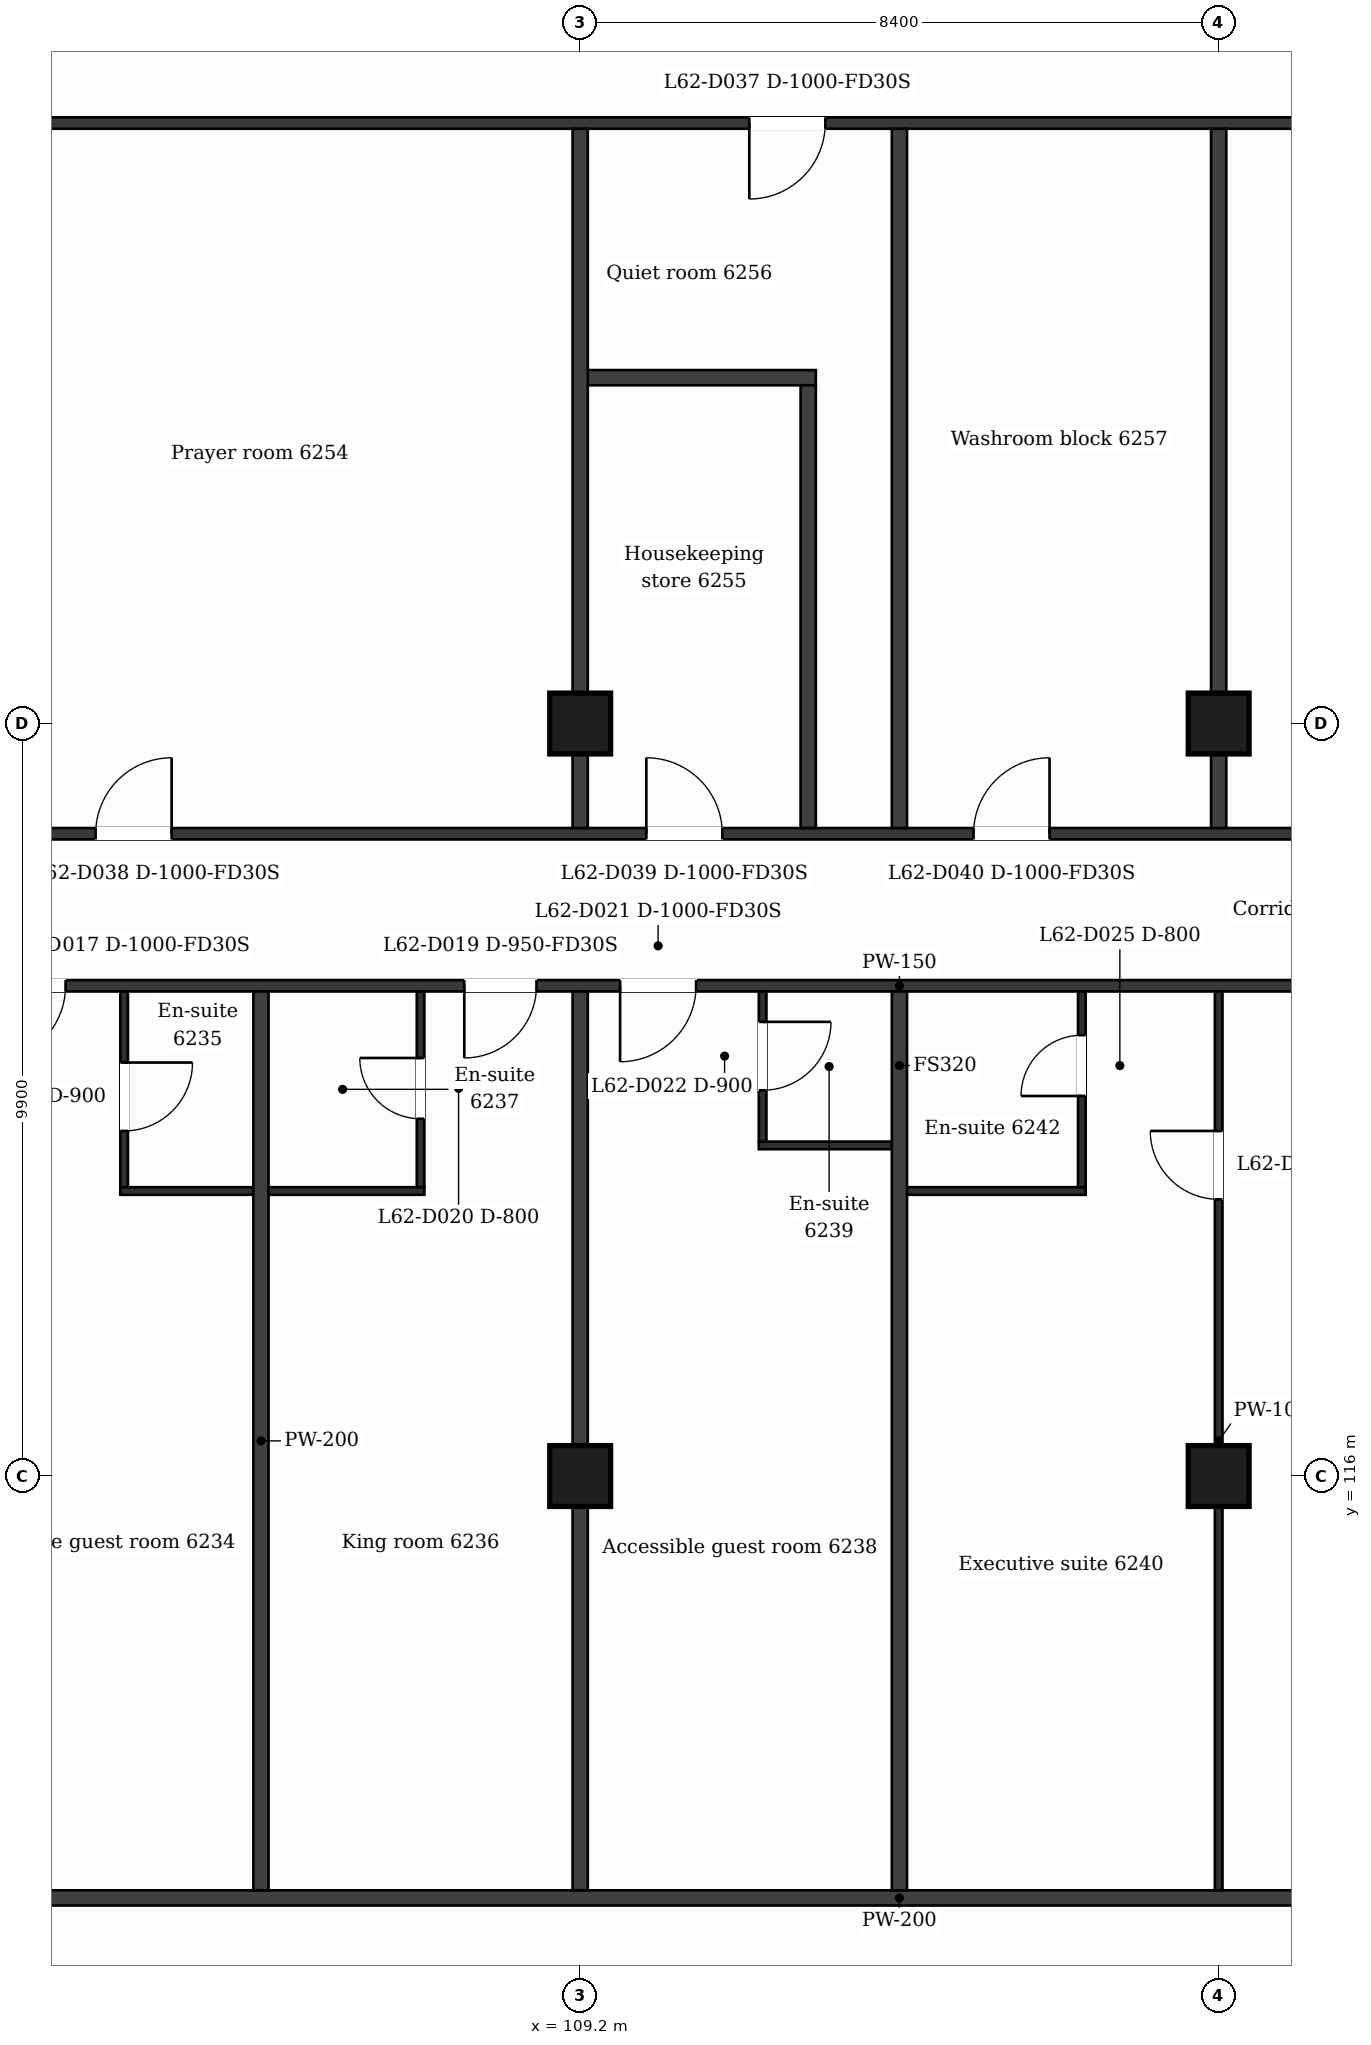
"""IFC4 building model, lengths in metres.
Left out: names, types, materials, properties, quantities, classifications, styles, units other than length and angle.
Written with IfcOpenShell. Run it as: python <this file> out.ifc"""

import sys

from ifc_helpers import new_model, si_unit, direction, frame, frame_2d, origin, origin_2d, place, context, subcontext, project, spatial, rectangle, extrude, element, fill, save


model = new_model("IFC4")
c1 = context("Model", 3, precision=1e-05, world=origin(), true_north=direction((0.0, 1.0)))
c2 = subcontext(c1, "Body", "Model", "MODEL_VIEW")
j1 = project(units=[si_unit("LENGTHUNIT", "METRE"), si_unit("PLANEANGLEUNIT", "RADIAN")], contexts=[c1])
p1 = place(None, origin())
s1 = spatial("IfcSite", under=j1, at=p1, CompositionType="ELEMENT")
p2 = place(p1, origin())
s2 = spatial("IfcBuilding", under=s1, at=p2, CompositionType="ELEMENT")
p3 = place(p2, frame((0.0, 0.0, 259.0)))
s3 = spatial("IfcBuildingStorey", under=s2, at=p3, CompositionType="ELEMENT", Elevation=259.0)
for number, where, z_axis, x_axis in (
    (1, (109.2, 116.0, 0.0), (0.0, 0.0, 1.0), (1.0, 0.0, 0.0)),
    (2, (117.6, 116.0, 0.0), (0.0, 0.0, 1.0), (1.0, 0.0, 0.0)),
    (3, (109.2, 125.9, 0.0), (0.0, 0.0, 1.0), (1.0, 0.0, 0.0)),
    (4, (117.6, 125.9, 0.0), (0.0, 0.0, 1.0), (1.0, 0.0, 0.0)),
):
    element("IfcColumn", number, at=place(p3, frame(where, z_axis=z_axis, x_axis=x_axis)), inside=s3, PredefinedType="COLUMN", context=c2, shape_type="SweptSolid", body=[
        extrude(rectangle(XDim=0.8, YDim=0.8, at=origin_2d()), origin(), (0.0, 0.0, 1.0), 3.7),
    ])
p4 = place(p3, frame((100.7, 110.45, 0.0), z_axis=(0.0, 0.0, 1.0), x_axis=(1.0, 0.0, 0.0)))
e5 = element("IfcWall", 5, at=p4, inside=s3, PredefinedType="PARTITIONING", context=c2, shape_type="SweptSolid", body=[
    extrude(rectangle(XDim=25.4, YDim=0.2, at=frame_2d((12.7, 0.0))), origin(), (0.0, 0.0, 1.0), 3.38),
])
p5 = place(p3, frame((103.15, 119.75, 0.0), z_axis=(0.0, 0.0, 1.0), x_axis=(1.0, 0.0, 0.0)))
e6 = element("IfcWall", 6, at=p5, inside=s3, PredefinedType="PARTITIONING", context=c2, shape_type="SweptSolid", body=[
    extrude(rectangle(XDim=4.0, YDim=0.1, at=frame_2d((2.0, 0.0))), origin(), (0.0, 0.0, 1.0), 3.38),
])
p6 = place(p3, frame((113.4, 119.75, 0.0), z_axis=(0.0, 0.0, 1.0), x_axis=(1.0, 0.0, 0.0)))
e7 = element("IfcWall", 7, at=p6, inside=s3, PredefinedType="PARTITIONING", context=c2, shape_type="SweptSolid", body=[
    extrude(rectangle(XDim=2.45, YDim=0.1, at=frame_2d((1.225, 0.0))), origin(), (0.0, 0.0, 1.0), 3.38),
])
p7 = place(p3, frame((111.55, 120.35, 0.0), z_axis=(0.0, 0.0, 1.0), x_axis=(1.0, 0.0, 0.0)))
e8 = element("IfcWall", 8, at=p7, inside=s3, PredefinedType="PARTITIONING", context=c2, shape_type="SweptSolid", body=[
    extrude(rectangle(XDim=1.85, YDim=0.1, at=frame_2d((0.925, 0.0))), origin(), (0.0, 0.0, 1.0), 3.38),
])
p8 = place(p3, frame((100.8, 122.45, 0.0), z_axis=(0.0, 0.0, 1.0), x_axis=(1.0, 0.0, 0.0)))
e9 = element("IfcWall", 9, at=p8, inside=s3, PredefinedType="PARTITIONING", context=c2, shape_type="SweptSolid", body=[
    extrude(rectangle(XDim=25.2, YDim=0.15, at=frame_2d((12.6, 0.0))), origin(), (0.0, 0.0, 1.0), 3.38),
])
p9 = place(p8, frame((0.63, 0.0, 0.0)))
e10 = element("IfcOpeningElement", 10, at=p9, cuts=e9, PredefinedType="OPENING", context=c2, shape_type="SweptSolid", body=[
    extrude(rectangle(XDim=1.0, YDim=2.1, at=frame_2d((0.5, 1.05))), frame((0.0, 0.085, 0.0), z_axis=(0.0, -1.0, 0.0), x_axis=(1.0, 0.0, 0.0)), (0.0, 0.0, 1.0), 0.17),
])
p10 = place(p8, frame((6.875, 0.0, 0.0)))
e11 = element("IfcOpeningElement", 11, at=p10, cuts=e9, PredefinedType="OPENING", context=c2, shape_type="SweptSolid", body=[
    extrude(rectangle(XDim=0.95, YDim=2.1, at=frame_2d((0.475, 1.05))), frame((0.0, 0.085, 0.0), z_axis=(0.0, -1.0, 0.0), x_axis=(1.0, 0.0, 0.0)), (0.0, 0.0, 1.0), 0.17),
])
p11 = place(p8, frame((8.925, 0.0, 0.0)))
e12 = element("IfcOpeningElement", 12, at=p11, cuts=e9, PredefinedType="OPENING", context=c2, shape_type="SweptSolid", body=[
    extrude(rectangle(XDim=1.0, YDim=2.1, at=frame_2d((0.5, 1.05))), frame((0.0, 0.085, 0.0), z_axis=(0.0, -1.0, 0.0), x_axis=(1.0, 0.0, 0.0)), (0.0, 0.0, 1.0), 0.17),
])
p12 = place(p8, frame((20.5, 0.0, 0.0)))
e13 = element("IfcOpeningElement", 13, at=p12, cuts=e9, PredefinedType="OPENING", context=c2, shape_type="SweptSolid", body=[
    extrude(rectangle(XDim=1.0, YDim=2.1, at=frame_2d((0.5, 1.05))), frame((0.0, 0.085, 0.0), z_axis=(0.0, -1.0, 0.0), x_axis=(1.0, 0.0, 0.0)), (0.0, 0.0, 1.0), 0.17),
])
p13 = place(p3, frame((100.8, 124.45, 0.0), z_axis=(0.0, 0.0, 1.0), x_axis=(1.0, 0.0, 0.0)))
e14 = element("IfcWall", 14, at=p13, inside=s3, PredefinedType="PARTITIONING", context=c2, shape_type="SweptSolid", body=[
    extrude(rectangle(XDim=25.2, YDim=0.15, at=frame_2d((12.6, 0.0))), origin(), (0.0, 0.0, 1.0), 3.38),
])
p14 = place(p13, frame((2.025, 0.0, 0.0)))
e15 = element("IfcOpeningElement", 15, at=p14, cuts=e14, PredefinedType="OPENING", context=c2, shape_type="SweptSolid", body=[
    extrude(rectangle(XDim=1.0, YDim=2.1, at=frame_2d((0.5, 1.05))), frame((0.0, 0.085, 0.0), z_axis=(0.0, -1.0, 0.0), x_axis=(1.0, 0.0, 0.0)), (0.0, 0.0, 1.0), 0.17),
])
p15 = place(p13, frame((9.27, 0.0, 0.0)))
e16 = element("IfcOpeningElement", 16, at=p15, cuts=e14, PredefinedType="OPENING", context=c2, shape_type="SweptSolid", body=[
    extrude(rectangle(XDim=1.0, YDim=2.1, at=frame_2d((0.5, 1.05))), frame((0.0, 0.085, 0.0), z_axis=(0.0, -1.0, 0.0), x_axis=(1.0, 0.0, 0.0)), (0.0, 0.0, 1.0), 0.17),
])
p16 = place(p13, frame((13.575, 0.0, 0.0)))
e17 = element("IfcOpeningElement", 17, at=p16, cuts=e14, PredefinedType="OPENING", context=c2, shape_type="SweptSolid", body=[
    extrude(rectangle(XDim=1.0, YDim=2.1, at=frame_2d((0.5, 1.05))), frame((0.0, 0.085, 0.0), z_axis=(0.0, -1.0, 0.0), x_axis=(1.0, 0.0, 0.0)), (0.0, 0.0, 1.0), 0.17),
])
p17 = place(p13, frame((21.17, 0.0, 0.0)))
e18 = element("IfcOpeningElement", 18, at=p17, cuts=e14, PredefinedType="OPENING", context=c2, shape_type="SweptSolid", body=[
    extrude(rectangle(XDim=1.0, YDim=2.1, at=frame_2d((0.5, 1.05))), frame((0.0, 0.085, 0.0), z_axis=(0.0, -1.0, 0.0), x_axis=(1.0, 0.0, 0.0)), (0.0, 0.0, 1.0), 0.17),
])
p18 = place(p3, frame((109.2, 130.45, 0.0), z_axis=(0.0, 0.0, 1.0), x_axis=(1.0, 0.0, 0.0)))
e19 = element("IfcWall", 19, at=p18, inside=s3, PredefinedType="PARTITIONING", context=c2, shape_type="SweptSolid", body=[
    extrude(rectangle(XDim=3.1, YDim=0.2, at=frame_2d((1.55, 0.0))), origin(), (0.0, 0.0, 1.0), 3.38),
])
p19 = place(p3, frame((100.725, 133.8, 0.0), z_axis=(0.0, 0.0, 1.0), x_axis=(1.0, 0.0, 0.0)))
e20 = element("IfcWall", 20, at=p19, inside=s3, PredefinedType="PARTITIONING", context=c2, shape_type="SweptSolid", body=[
    extrude(rectangle(XDim=25.35, YDim=0.15, at=frame_2d((12.675, 0.0))), origin(), (0.0, 0.0, 1.0), 3.38),
])
p20 = place(p19, frame((10.7, 0.0, 0.0)))
e21 = element("IfcOpeningElement", 21, at=p20, cuts=e20, PredefinedType="OPENING", context=c2, shape_type="SweptSolid", body=[
    extrude(rectangle(XDim=1.0, YDim=2.1, at=frame_2d((0.5, 1.05))), frame((0.0, 0.085, 0.0), z_axis=(0.0, -1.0, 0.0), x_axis=(1.0, 0.0, 0.0)), (0.0, 0.0, 1.0), 0.17),
])
p21 = place(p3, frame((103.2, 119.8, 0.0), z_axis=(0.0, 0.0, 1.0), x_axis=(0.0, 1.0, 0.0)))
e22 = element("IfcWall", 22, at=p21, inside=s3, PredefinedType="PARTITIONING", context=c2, shape_type="SweptSolid", body=[
    extrude(rectangle(XDim=2.575, YDim=0.1, at=frame_2d((1.288, 0.0))), origin(), (0.0, 0.0, 1.0), 3.38),
])
p22 = place(p21, frame((0.74, 0.0, 0.0)))
e23 = element("IfcOpeningElement", 23, at=p22, cuts=e22, PredefinedType="OPENING", context=c2, shape_type="SweptSolid", body=[
    extrude(rectangle(XDim=0.9, YDim=2.1, at=frame_2d((0.45, 1.05))), frame((0.0, 0.06, 0.0), z_axis=(0.0, -1.0, 0.0), x_axis=(1.0, 0.0, 0.0)), (0.0, 0.0, 1.0), 0.12),
])
p23 = place(p3, frame((105.0, 110.55, 0.0), z_axis=(0.0, 0.0, 1.0), x_axis=(0.0, 1.0, 0.0)))
e24 = element("IfcWall", 24, at=p23, inside=s3, PredefinedType="PARTITIONING", context=c2, shape_type="SweptSolid", body=[
    extrude(rectangle(XDim=11.825, YDim=0.2, at=frame_2d((5.913, 0.0))), origin(), (0.0, 0.0, 1.0), 3.38),
])
p24 = place(p3, frame((107.1, 119.8, 0.0), z_axis=(0.0, 0.0, 1.0), x_axis=(0.0, 1.0, 0.0)))
e25 = element("IfcWall", 25, at=p24, inside=s3, PredefinedType="PARTITIONING", context=c2, shape_type="SweptSolid", body=[
    extrude(rectangle(XDim=2.575, YDim=0.1, at=frame_2d((1.288, 0.0))), origin(), (0.0, 0.0, 1.0), 3.38),
])
p25 = place(p24, frame((0.9, 0.0, 0.0)))
e26 = element("IfcOpeningElement", 26, at=p25, cuts=e25, PredefinedType="OPENING", context=c2, shape_type="SweptSolid", body=[
    extrude(rectangle(XDim=0.8, YDim=2.1, at=frame_2d((0.4, 1.05))), frame((0.0, 0.06, 0.0), z_axis=(0.0, -1.0, 0.0), x_axis=(1.0, 0.0, 0.0)), (0.0, 0.0, 1.0), 0.12),
])
p26 = place(p3, frame((109.2, 110.55, 0.0), z_axis=(0.0, 0.0, 1.0), x_axis=(0.0, 1.0, 0.0)))
e27 = element("IfcWall", 27, at=p26, inside=s3, PredefinedType="PARTITIONING", context=c2, shape_type="SweptSolid", body=[
    extrude(rectangle(XDim=11.825, YDim=0.2, at=frame_2d((5.913, 0.0))), origin(), (0.0, 0.0, 1.0), 3.38),
])
p27 = place(p3, frame((109.2, 124.525, 0.0), z_axis=(0.0, 0.0, 1.0), x_axis=(0.0, 1.0, 0.0)))
e28 = element("IfcWall", 28, at=p27, inside=s3, PredefinedType="PARTITIONING", context=c2, shape_type="SweptSolid", body=[
    extrude(rectangle(XDim=9.2, YDim=0.2, at=frame_2d((4.6, 0.0))), origin(), (0.0, 0.0, 1.0), 3.38),
])
p28 = place(p3, frame((111.6, 120.4, 0.0), z_axis=(0.0, 0.0, 1.0), x_axis=(0.0, 1.0, 0.0)))
e29 = element("IfcWall", 29, at=p28, inside=s3, PredefinedType="PARTITIONING", context=c2, shape_type="SweptSolid", body=[
    extrude(rectangle(XDim=1.975, YDim=0.1, at=frame_2d((0.988, 0.0))), origin(), (0.0, 0.0, 1.0), 3.38),
])
p29 = place(p28, frame((0.675, 0.0, 0.0)))
e30 = element("IfcOpeningElement", 30, at=p29, cuts=e29, PredefinedType="OPENING", context=c2, shape_type="SweptSolid", body=[
    extrude(rectangle(XDim=0.9, YDim=2.1, at=frame_2d((0.45, 1.05))), frame((0.0, 0.06, 0.0), z_axis=(0.0, -1.0, 0.0), x_axis=(1.0, 0.0, 0.0)), (0.0, 0.0, 1.0), 0.12),
])
p30 = place(p3, frame((112.2, 124.525, 0.0), z_axis=(0.0, 0.0, 1.0), x_axis=(0.0, 1.0, 0.0)))
e31 = element("IfcWall", 31, at=p30, inside=s3, PredefinedType="PARTITIONING", context=c2, shape_type="SweptSolid", body=[
    extrude(rectangle(XDim=5.825, YDim=0.2, at=frame_2d((2.913, 0.0))), origin(), (0.0, 0.0, 1.0), 3.38),
])
p31 = place(p3, frame((113.4, 110.55, 0.0), z_axis=(0.0, 0.0, 1.0), x_axis=(0.0, 1.0, 0.0)))
e32 = element("IfcWall", 32, at=p31, inside=s3, PredefinedType="PARTITIONING", context=c2, shape_type="SweptSolid", body=[
    extrude(rectangle(XDim=11.825, YDim=0.2, at=frame_2d((5.913, 0.0))), origin(), (0.0, 0.0, 1.0), 3.38),
])
p32 = place(p3, frame((113.4, 124.525, 0.0), z_axis=(0.0, 0.0, 1.0), x_axis=(0.0, 1.0, 0.0)))
e33 = element("IfcWall", 33, at=p32, inside=s3, PredefinedType="PARTITIONING", context=c2, shape_type="SweptSolid", body=[
    extrude(rectangle(XDim=9.2, YDim=0.2, at=frame_2d((4.6, 0.0))), origin(), (0.0, 0.0, 1.0), 3.38),
])
p33 = place(p3, frame((115.8, 119.8, 0.0), z_axis=(0.0, 0.0, 1.0), x_axis=(0.0, 1.0, 0.0)))
e34 = element("IfcWall", 34, at=p33, inside=s3, PredefinedType="PARTITIONING", context=c2, shape_type="SweptSolid", body=[
    extrude(rectangle(XDim=2.575, YDim=0.1, at=frame_2d((1.288, 0.0))), origin(), (0.0, 0.0, 1.0), 3.38),
])
p34 = place(p33, frame((1.2, 0.0, 0.0)))
e35 = element("IfcOpeningElement", 35, at=p34, cuts=e34, PredefinedType="OPENING", context=c2, shape_type="SweptSolid", body=[
    extrude(rectangle(XDim=0.8, YDim=2.1, at=frame_2d((0.4, 1.05))), frame((0.0, 0.06, 0.0), z_axis=(0.0, -1.0, 0.0), x_axis=(1.0, 0.0, 0.0)), (0.0, 0.0, 1.0), 0.12),
])
p35 = place(p3, frame((117.6, 110.55, 0.0), z_axis=(0.0, 0.0, 1.0), x_axis=(0.0, 1.0, 0.0)))
e36 = element("IfcWall", 36, at=p35, inside=s3, PredefinedType="PARTITIONING", context=c2, shape_type="SweptSolid", body=[
    extrude(rectangle(XDim=11.825, YDim=0.1, at=frame_2d((5.913, 0.0))), origin(), (0.0, 0.0, 1.0), 3.38),
])
p36 = place(p35, frame((9.09, 0.0, 0.0)))
e37 = element("IfcOpeningElement", 37, at=p36, cuts=e36, PredefinedType="OPENING", context=c2, shape_type="SweptSolid", body=[
    extrude(rectangle(XDim=0.9, YDim=2.1, at=frame_2d((0.45, 1.05))), frame((0.0, 0.06, 0.0), z_axis=(0.0, -1.0, 0.0), x_axis=(1.0, 0.0, 0.0)), (0.0, 0.0, 1.0), 0.12),
])
p37 = place(p3, frame((117.6, 124.525, 0.0), z_axis=(0.0, 0.0, 1.0), x_axis=(0.0, 1.0, 0.0)))
e38 = element("IfcWall", 38, at=p37, inside=s3, PredefinedType="PARTITIONING", context=c2, shape_type="SweptSolid", body=[
    extrude(rectangle(XDim=9.2, YDim=0.2, at=frame_2d((4.6, 0.0))), origin(), (0.0, 0.0, 1.0), 3.38),
])
p38 = place(p9, origin())
e39 = element("IfcDoor", 39, at=p38, inside=s3, OperationType="SINGLE_SWING_LEFT", PredefinedType="DOOR", context=c2, shape_type="SweptSolid", body=[
    extrude(rectangle(XDim=1.0, YDim=2.1, at=frame_2d((0.5, 1.05))), frame((0.0, 0.025, 0.0), z_axis=(0.0, -1.0, 0.0), x_axis=(1.0, 0.0, 0.0)), (0.0, 0.0, 1.0), 0.05),
])
fill(e10, e39)
p39 = place(p22, origin())
e40 = element("IfcDoor", 40, at=p39, inside=s3, OperationType="SINGLE_SWING_RIGHT", PredefinedType="DOOR", context=c2, shape_type="SweptSolid", body=[
    extrude(rectangle(XDim=0.9, YDim=2.1, at=frame_2d((0.45, 1.05))), frame((0.0, 0.025, 0.0), z_axis=(0.0, -1.0, 0.0), x_axis=(1.0, 0.0, 0.0)), (0.0, 0.0, 1.0), 0.05),
])
fill(e23, e40)
p40 = place(p10, origin())
e41 = element("IfcDoor", 41, at=p40, inside=s3, OperationType="SINGLE_SWING_LEFT", PredefinedType="DOOR", context=c2, shape_type="SweptSolid", body=[
    extrude(rectangle(XDim=0.95, YDim=2.1, at=frame_2d((0.475, 1.05))), frame((0.0, 0.025, 0.0), z_axis=(0.0, -1.0, 0.0), x_axis=(1.0, 0.0, 0.0)), (0.0, 0.0, 1.0), 0.05),
])
fill(e11, e41)
p41 = place(p25, origin())
e42 = element("IfcDoor", 42, at=p41, inside=s3, OperationType="SINGLE_SWING_RIGHT", PredefinedType="DOOR", context=c2, shape_type="SweptSolid", body=[
    extrude(rectangle(XDim=0.8, YDim=2.1, at=frame_2d((0.4, 1.05))), frame((0.0, 0.025, 0.0), z_axis=(0.0, -1.0, 0.0), x_axis=(1.0, 0.0, 0.0)), (0.0, 0.0, 1.0), 0.05),
])
fill(e26, e42)
p42 = place(p11, origin())
e43 = element("IfcDoor", 43, at=p42, inside=s3, OperationType="SINGLE_SWING_LEFT", PredefinedType="DOOR", context=c2, shape_type="SweptSolid", body=[
    extrude(rectangle(XDim=1.0, YDim=2.1, at=frame_2d((0.5, 1.05))), frame((0.0, 0.025, 0.0), z_axis=(0.0, -1.0, 0.0), x_axis=(1.0, 0.0, 0.0)), (0.0, 0.0, 1.0), 0.05),
])
fill(e12, e43)
p43 = place(p29, origin())
e44 = element("IfcDoor", 44, at=p43, inside=s3, OperationType="SINGLE_SWING_RIGHT", PredefinedType="DOOR", context=c2, shape_type="SweptSolid", body=[
    extrude(rectangle(XDim=0.9, YDim=2.1, at=frame_2d((0.45, 1.05))), frame((0.0, 0.025, 0.0), z_axis=(0.0, -1.0, 0.0), x_axis=(1.0, 0.0, 0.0)), (0.0, 0.0, 1.0), 0.05),
])
fill(e30, e44)
p44 = place(p36, origin())
e45 = element("IfcDoor", 45, at=p44, inside=s3, OperationType="SINGLE_SWING_RIGHT", PredefinedType="DOOR", context=c2, shape_type="SweptSolid", body=[
    extrude(rectangle(XDim=0.9, YDim=2.1, at=frame_2d((0.45, 1.05))), frame((0.0, 0.025, 0.0), z_axis=(0.0, -1.0, 0.0), x_axis=(1.0, 0.0, 0.0)), (0.0, 0.0, 1.0), 0.05),
])
fill(e37, e45)
p45 = place(p34, origin())
e46 = element("IfcDoor", 46, at=p45, inside=s3, OperationType="SINGLE_SWING_LEFT", PredefinedType="DOOR", context=c2, shape_type="SweptSolid", body=[
    extrude(rectangle(XDim=0.8, YDim=2.1, at=frame_2d((0.4, 1.05))), frame((0.0, 0.025, 0.0), z_axis=(0.0, -1.0, 0.0), x_axis=(1.0, 0.0, 0.0)), (0.0, 0.0, 1.0), 0.05),
])
fill(e35, e46)
p46 = place(p20, origin())
e47 = element("IfcDoor", 47, at=p46, inside=s3, OperationType="SINGLE_SWING_LEFT", PredefinedType="DOOR", context=c2, shape_type="SweptSolid", body=[
    extrude(rectangle(XDim=1.0, YDim=2.1, at=frame_2d((0.5, 1.05))), frame((0.0, 0.025, 0.0), z_axis=(0.0, -1.0, 0.0), x_axis=(1.0, 0.0, 0.0)), (0.0, 0.0, 1.0), 0.05),
])
fill(e21, e47)
p47 = place(p14, origin())
e48 = element("IfcDoor", 48, at=p47, inside=s3, OperationType="SINGLE_SWING_RIGHT", PredefinedType="DOOR", context=c2, shape_type="SweptSolid", body=[
    extrude(rectangle(XDim=1.0, YDim=2.1, at=frame_2d((0.5, 1.05))), frame((0.0, 0.025, 0.0), z_axis=(0.0, -1.0, 0.0), x_axis=(1.0, 0.0, 0.0)), (0.0, 0.0, 1.0), 0.05),
])
fill(e15, e48)
p48 = place(p15, origin())
e49 = element("IfcDoor", 49, at=p48, inside=s3, OperationType="SINGLE_SWING_LEFT", PredefinedType="DOOR", context=c2, shape_type="SweptSolid", body=[
    extrude(rectangle(XDim=1.0, YDim=2.1, at=frame_2d((0.5, 1.05))), frame((0.0, 0.025, 0.0), z_axis=(0.0, -1.0, 0.0), x_axis=(1.0, 0.0, 0.0)), (0.0, 0.0, 1.0), 0.05),
])
fill(e16, e49)
p49 = place(p16, origin())
e50 = element("IfcDoor", 50, at=p49, inside=s3, OperationType="SINGLE_SWING_RIGHT", PredefinedType="DOOR", context=c2, shape_type="SweptSolid", body=[
    extrude(rectangle(XDim=1.0, YDim=2.1, at=frame_2d((0.5, 1.05))), frame((0.0, 0.025, 0.0), z_axis=(0.0, -1.0, 0.0), x_axis=(1.0, 0.0, 0.0)), (0.0, 0.0, 1.0), 0.05),
])
fill(e17, e50)
save(model, sys.argv[1])
